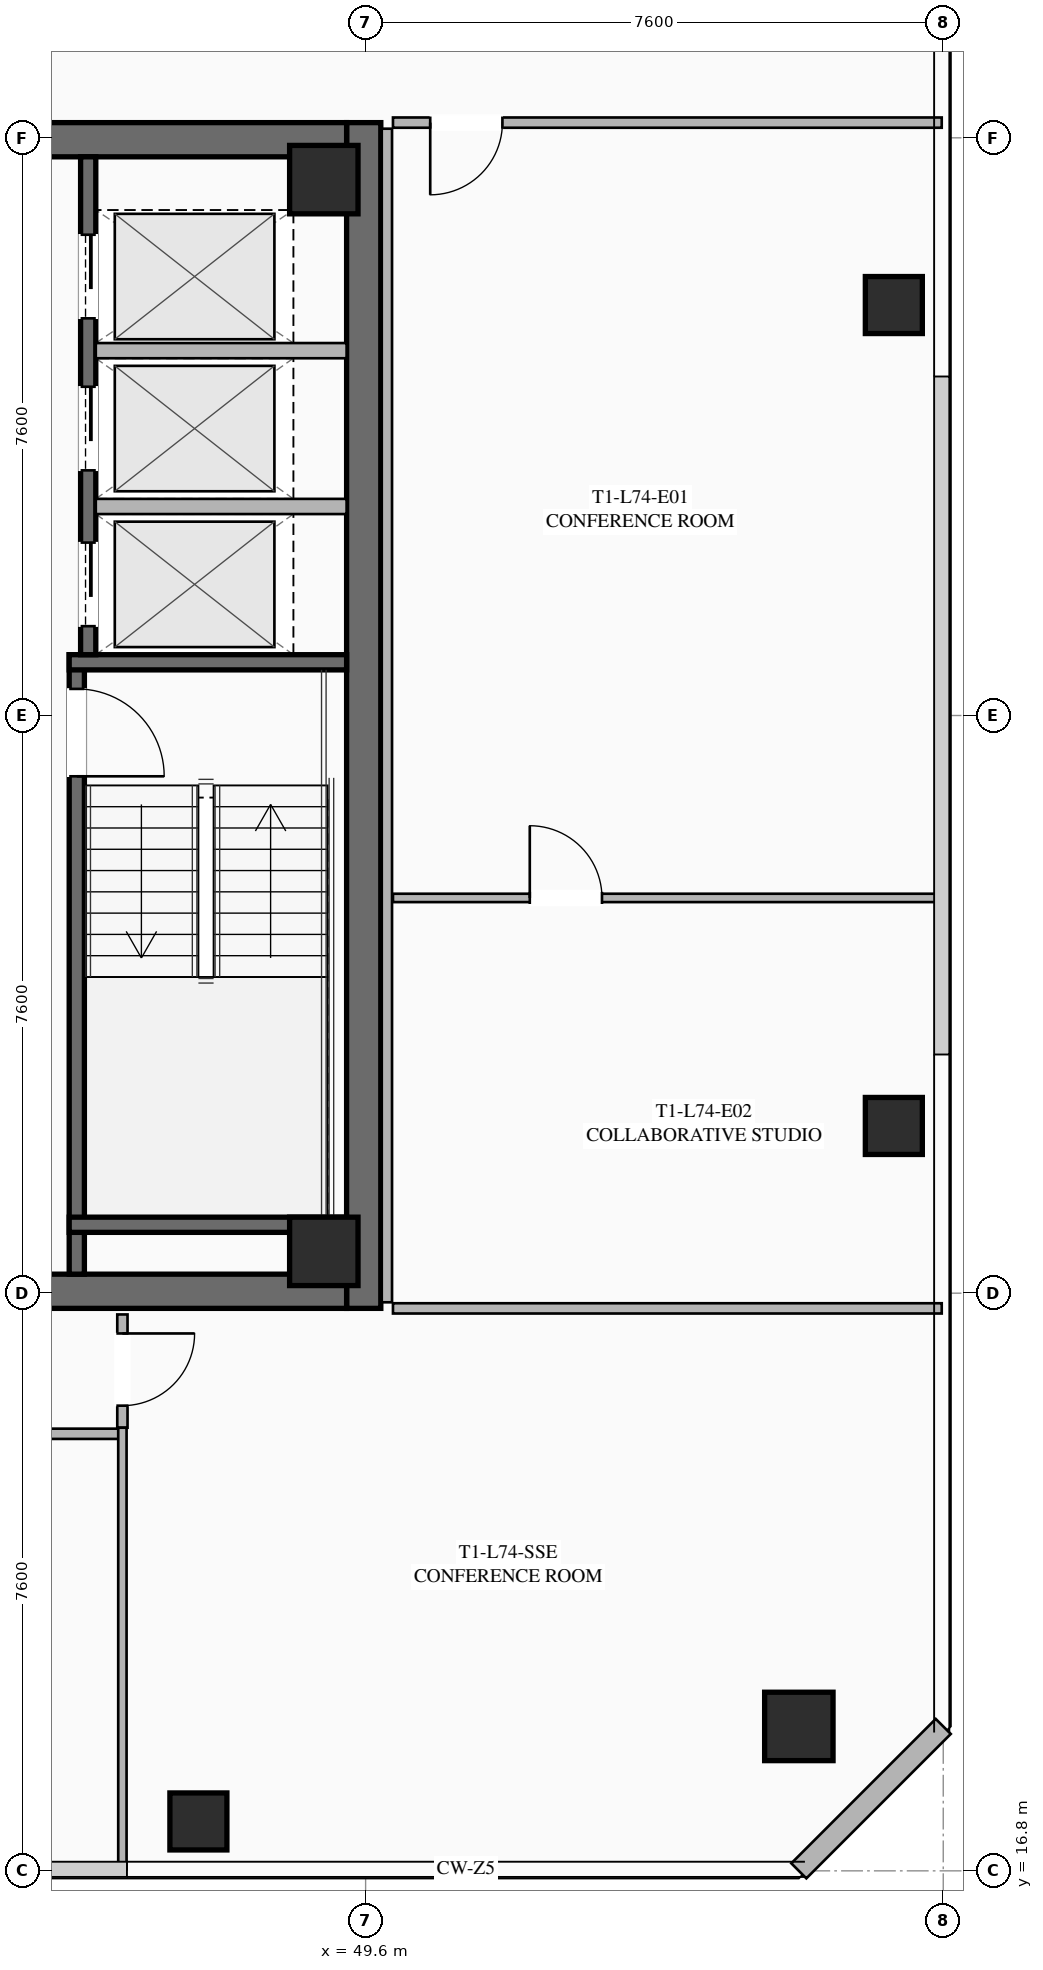
"""IFC4 building model, lengths in metres.
Left out: names, types, materials, properties, quantities, classifications, styles, units other than length and angle.
Written with IfcOpenShell. Run it as: python <this file> out.ifc"""

import sys

from ifc_helpers import new_model, si_unit, direction, frame, frame_2d, origin, origin_2d, place, context, subcontext, project, spatial, rectangle, hollow_rectangle, extrude, element, fill, save


model = new_model("IFC4")
c1 = context("Model", 3, precision=1e-05, world=origin(), true_north=direction((0.0, 1.0)))
c2 = subcontext(c1, "Body", "Model", "MODEL_VIEW")
j1 = project(units=[si_unit("LENGTHUNIT", "METRE"), si_unit("PLANEANGLEUNIT", "RADIAN")], contexts=[c1])
p1 = place(None, origin())
s1 = spatial("IfcSite", under=j1, at=p1, CompositionType="ELEMENT")
p2 = place(p1, origin())
s2 = spatial("IfcBuilding", under=s1, at=p2, CompositionType="ELEMENT")
p3 = place(p2, frame((0.0, 0.0, 274.05)))
s3 = spatial("IfcBuildingStorey", under=s2, at=p3, CompositionType="ELEMENT", Elevation=274.05)
p4 = place(p3, frame((49.575, 39.8, 0.0), z_axis=(0.0, 0.0, 1.0), x_axis=(0.0, -1.0, 0.0)))
e1 = element("IfcWall", 1, at=p4, inside=s3, PredefinedType="SHEAR", context=c2, shape_type="SweptSolid", body=[
    extrude(rectangle(XDim=15.6, YDim=0.45, at=frame_2d((7.8, 0.0))), origin(), (0.0, 0.0, 1.0), 3.55),
])
p5 = place(p3, frame((49.35, 24.425, 0.0), z_axis=(0.0, 0.0, 1.0), x_axis=(-1.0, 0.0, 0.0)))
e2 = element("IfcWall", 2, at=p5, inside=s3, PredefinedType="SHEAR", context=c2, shape_type="SweptSolid", body=[
    extrude(rectangle(XDim=14.7, YDim=0.45, at=frame_2d((7.35, 0.0))), origin(), (0.0, 0.0, 1.0), 3.55),
])
p6 = place(p5, frame((9.05, 0.0, 0.0)))
e3 = element("IfcOpeningElement", 3, at=p6, cuts=e2, PredefinedType="OPENING", context=c2, shape_type="SweptSolid", body=[
    extrude(rectangle(XDim=1.25, YDim=2.25, at=frame_2d((0.625, 1.125))), frame((0.0, 0.235, 0.0), z_axis=(0.0, -1.0, 0.0), x_axis=(1.0, 0.0, 0.0)), (0.0, 0.0, 1.0), 0.47),
])
p7 = place(p5, frame((4.0, 0.0, 0.0)))
e4 = element("IfcOpeningElement", 4, at=p7, cuts=e2, PredefinedType="OPENING", context=c2, shape_type="SweptSolid", body=[
    extrude(rectangle(XDim=1.25, YDim=2.25, at=frame_2d((0.625, 1.125))), frame((0.0, 0.235, 0.0), z_axis=(0.0, -1.0, 0.0), x_axis=(1.0, 0.0, 0.0)), (0.0, 0.0, 1.0), 0.47),
])
p8 = place(p3, frame((34.65, 39.575, 0.0), z_axis=(0.0, 0.0, 1.0), x_axis=(1.0, 0.0, 0.0)))
e5 = element("IfcWall", 5, at=p8, inside=s3, PredefinedType="SHEAR", context=c2, shape_type="SweptSolid", body=[
    extrude(rectangle(XDim=14.7, YDim=0.45, at=frame_2d((7.35, 0.0))), origin(), (0.0, 0.0, 1.0), 3.55),
])
p9 = place(p8, frame((4.4, 0.0, 0.0)))
e6 = element("IfcOpeningElement", 6, at=p9, cuts=e5, PredefinedType="OPENING", context=c2, shape_type="SweptSolid", body=[
    extrude(rectangle(XDim=1.25, YDim=2.25, at=frame_2d((0.625, 1.125))), frame((0.0, 0.235, 0.0), z_axis=(0.0, -1.0, 0.0), x_axis=(1.0, 0.0, 0.0)), (0.0, 0.0, 1.0), 0.47),
])
p10 = place(p8, frame((9.45, 0.0, 0.0)))
e7 = element("IfcOpeningElement", 7, at=p10, cuts=e5, PredefinedType="OPENING", context=c2, shape_type="SweptSolid", body=[
    extrude(rectangle(XDim=1.25, YDim=2.25, at=frame_2d((0.625, 1.125))), frame((0.0, 0.235, 0.0), z_axis=(0.0, -1.0, 0.0), x_axis=(1.0, 0.0, 0.0)), (0.0, 0.0, 1.0), 0.47),
])
for number, where, z_axis, x_axis in (
    (8, (49.05, 24.95, 0.0), (0.0, 0.0, 1.0), (1.0, 0.0, 0.0)),
    (9, (49.05, 39.05, 0.0), (0.0, 0.0, 1.0), (1.0, 0.0, 0.0)),
    (10, (55.3, 18.7, 0.0), (0.0, 0.0, 1.0), (1.0, 0.0, 0.0)),
):
    element("IfcColumn", number, at=place(p3, frame(where, z_axis=z_axis, x_axis=x_axis)), inside=s3, PredefinedType="COLUMN", context=c2, shape_type="SweptSolid", body=[
        extrude(hollow_rectangle(XDim=0.9, YDim=0.9, WallThickness=0.04, at=origin_2d()), origin(), (0.0, 0.0, 1.0), 3.25),
    ])
for number, where, z_axis, x_axis in (
    (11, (47.4, 17.45, 0.0), (0.0, 0.0, 1.0), (1.0, 0.0, 0.0)),
    (12, (56.55, 26.6, 0.0), (0.0, 0.0, 1.0), (1.0, 0.0, 0.0)),
    (13, (56.55, 37.4, 0.0), (0.0, 0.0, 1.0), (1.0, 0.0, 0.0)),
):
    element("IfcColumn", number, at=place(p3, frame(where, z_axis=z_axis, x_axis=x_axis)), inside=s3, PredefinedType="COLUMN", context=c2, shape_type="SweptSolid", body=[
        extrude(hollow_rectangle(XDim=0.75, YDim=0.75, WallThickness=0.032, at=origin_2d()), origin(), (0.0, 0.0, 1.0), 3.25),
    ])
p11 = place(p3, frame((57.2, 18.7, 0.0), z_axis=(0.0, 0.0, 1.0), x_axis=(-0.707106781187, -0.707106781187, 0.0)))
e14 = element("IfcWall", 14, at=p11, inside=s3, PredefinedType="SOLIDWALL", context=c2, shape_type="SweptSolid", body=[
    extrude(rectangle(XDim=2.687, YDim=0.28, at=frame_2d((1.343, 0.0))), origin(), (0.0, 0.0, 1.0), 3.25),
])
p12 = place(p3, frame((45.8, 32.8, 0.0), z_axis=(0.0, 0.0, 1.0), x_axis=(0.0, -1.0, 0.0)))
e15 = element("IfcWall", 15, at=p12, inside=s3, PredefinedType="SHEAR", context=c2, shape_type="SweptSolid", body=[
    extrude(rectangle(XDim=8.15, YDim=0.2, at=frame_2d((4.075, 0.0))), origin(), (0.0, 0.0, 1.0), 3.25),
])
p13 = place(p12, frame((0.45, 0.0, 0.0)))
e16 = element("IfcOpeningElement", 16, at=p13, cuts=e15, PredefinedType="OPENING", context=c2, shape_type="SweptSolid", body=[
    extrude(rectangle(XDim=1.15, YDim=2.2, at=frame_2d((0.575, 1.1))), frame((0.0, 0.11, 0.0), z_axis=(0.0, -1.0, 0.0), x_axis=(1.0, 0.0, 0.0)), (0.0, 0.0, 1.0), 0.22),
])
for number, where, z_axis, x_axis in (
    (17, (45.7, 32.7, 0.0), (0.0, 0.0, 1.0), (1.0, 0.0, 0.0)),
    (18, (45.7, 25.3, 0.0), (0.0, 0.0, 1.0), (1.0, 0.0, 0.0)),
):
    element("IfcWall", number, at=place(p3, frame(where, z_axis=z_axis, x_axis=x_axis)), inside=s3, PredefinedType="SHEAR", context=c2, shape_type="SweptSolid", body=[
        extrude(rectangle(XDim=3.65, YDim=0.2, at=frame_2d((1.825, 0.0))), origin(), (0.0, 0.0, 1.0), 3.25),
    ])
p14 = place(p3, frame((45.95, 39.35, 0.0), z_axis=(0.0, 0.0, 1.0), x_axis=(0.0, -1.0, 0.0)))
e19 = element("IfcWall", 19, at=p14, inside=s3, PredefinedType="SHEAR", context=c2, shape_type="SweptSolid", body=[
    extrude(rectangle(XDim=6.55, YDim=0.2, at=frame_2d((3.275, 0.0))), origin(), (0.0, 0.0, 1.0), 3.25),
])
p15 = place(p14, frame((5.075, 0.0, 0.0)))
e20 = element("IfcOpeningElement", 20, at=p15, cuts=e19, PredefinedType="OPENING", context=c2, shape_type="SweptSolid", body=[
    extrude(rectangle(XDim=1.1, YDim=2.2, at=frame_2d((0.55, 1.1))), frame((0.0, 0.11, 0.0), z_axis=(0.0, -1.0, 0.0), x_axis=(1.0, 0.0, 0.0)), (0.0, 0.0, 1.0), 0.22),
])
p16 = place(p14, frame((3.025, 0.0, 0.0)))
e21 = element("IfcOpeningElement", 21, at=p16, cuts=e19, PredefinedType="OPENING", context=c2, shape_type="SweptSolid", body=[
    extrude(rectangle(XDim=1.1, YDim=2.2, at=frame_2d((0.55, 1.1))), frame((0.0, 0.11, 0.0), z_axis=(0.0, -1.0, 0.0), x_axis=(1.0, 0.0, 0.0)), (0.0, 0.0, 1.0), 0.22),
])
p17 = place(p14, frame((1.025, 0.0, 0.0)))
e22 = element("IfcOpeningElement", 22, at=p17, cuts=e19, PredefinedType="OPENING", context=c2, shape_type="SweptSolid", body=[
    extrude(rectangle(XDim=1.1, YDim=2.2, at=frame_2d((0.55, 1.1))), frame((0.0, 0.11, 0.0), z_axis=(0.0, -1.0, 0.0), x_axis=(1.0, 0.0, 0.0)), (0.0, 0.0, 1.0), 0.22),
])
for number, where, z_axis, x_axis in (
    (23, (46.05, 34.75, 0.0), (0.0, 0.0, 1.0), (1.0, 0.0, 0.0)),
    (24, (46.05, 36.8, 0.0), (0.0, 0.0, 1.0), (1.0, 0.0, 0.0)),
):
    element("IfcWall", number, at=place(p3, frame(where, z_axis=z_axis, x_axis=x_axis)), inside=s3, PredefinedType="SOLIDWALL", context=c2, shape_type="SweptSolid", body=[
        extrude(rectangle(XDim=3.3, YDim=0.2, at=frame_2d((1.65, 0.0))), origin(), (0.0, 0.0, 1.0), 3.25),
    ])
p18 = place(p3, frame((46.4, 22.55, 0.0), z_axis=(0.0, 0.0, 1.0), x_axis=(-1.0, 0.0, 0.0)))
e25 = element("IfcWall", 25, at=p18, inside=s3, PredefinedType="PARTITIONING", context=c2, shape_type="SweptSolid", body=[
    extrude(rectangle(XDim=17.55, YDim=0.135, at=frame_2d((8.775, 0.0))), origin(), (0.0, 0.0, 1.0), 2.603),
])
p19 = place(p18, frame((16.22, 0.0, 0.0)))
e26 = element("IfcOpeningElement", 26, at=p19, cuts=e25, PredefinedType="OPENING", context=c2, shape_type="SweptSolid", body=[
    extrude(rectangle(XDim=0.95, YDim=2.05, at=frame_2d((0.475, 1.025))), frame((0.0, 0.077, 0.0), z_axis=(0.0, -1.0, 0.0), x_axis=(1.0, 0.0, 0.0)), (0.0, 0.0, 1.0), 0.155),
])
p20 = place(p18, frame((3.718, 0.0, 0.0)))
e27 = element("IfcOpeningElement", 27, at=p20, cuts=e25, PredefinedType="OPENING", context=c2, shape_type="SweptSolid", body=[
    extrude(rectangle(XDim=0.95, YDim=2.05, at=frame_2d((0.475, 1.025))), frame((0.0, 0.077, 0.0), z_axis=(0.0, -1.0, 0.0), x_axis=(1.0, 0.0, 0.0)), (0.0, 0.0, 1.0), 0.155),
])
p21 = place(p3, frame((46.4, 24.12, 0.0), z_axis=(0.0, 0.0, 1.0), x_axis=(0.0, -1.0, 0.0)))
e28 = element("IfcWall", 28, at=p21, inside=s3, PredefinedType="PARTITIONING", context=c2, shape_type="SweptSolid", body=[
    extrude(rectangle(XDim=1.49, YDim=0.135, at=frame_2d((0.745, 0.0))), origin(), (0.0, 0.0, 1.0), 2.603),
])
p22 = place(p21, frame((0.25, 0.0, 0.0)))
e29 = element("IfcOpeningElement", 29, at=p22, cuts=e28, PredefinedType="OPENING", context=c2, shape_type="SweptSolid", body=[
    extrude(rectangle(XDim=0.95, YDim=2.05, at=frame_2d((0.475, 1.025))), frame((0.0, 0.077, 0.0), z_axis=(0.0, -1.0, 0.0), x_axis=(1.0, 0.0, 0.0)), (0.0, 0.0, 1.0), 0.155),
])
p23 = place(p3, frame((46.4, 16.82, 0.0), z_axis=(0.0, 0.0, 1.0), x_axis=(0.0, 1.0, 0.0)))
e30 = element("IfcWall", 30, at=p23, inside=s3, PredefinedType="PARTITIONING", context=c2, shape_type="SweptSolid", body=[
    extrude(rectangle(XDim=5.81, YDim=0.11, at=frame_2d((2.905, 0.0))), origin(), (0.0, 0.0, 1.0), 2.603),
])
p24 = place(p3, frame((49.88, 39.72, 0.0), z_axis=(0.0, 0.0, 1.0), x_axis=(0.0, -1.0, 0.0)))
e31 = element("IfcWall", 31, at=p24, inside=s3, PredefinedType="PARTITIONING", context=c2, shape_type="SweptSolid", body=[
    extrude(rectangle(XDim=15.44, YDim=0.135, at=frame_2d((7.72, 0.0))), origin(), (0.0, 0.0, 1.0), 2.603),
])
p25 = place(p3, frame((57.18, 39.8, 0.0), z_axis=(0.0, 0.0, 1.0), x_axis=(-1.0, 0.0, 0.0)))
e32 = element("IfcWall", 32, at=p25, inside=s3, PredefinedType="PARTITIONING", context=c2, shape_type="SweptSolid", body=[
    extrude(rectangle(XDim=7.22, YDim=0.135, at=frame_2d((3.61, 0.0))), origin(), (0.0, 0.0, 1.0), 2.603),
])
p26 = place(p25, frame((5.78, 0.0, 0.0)))
e33 = element("IfcOpeningElement", 33, at=p26, cuts=e32, PredefinedType="OPENING", context=c2, shape_type="SweptSolid", body=[
    extrude(rectangle(XDim=0.95, YDim=2.05, at=frame_2d((0.475, 1.025))), frame((0.0, 0.077, 0.0), z_axis=(0.0, -1.0, 0.0), x_axis=(1.0, 0.0, 0.0)), (0.0, 0.0, 1.0), 0.155),
])
p27 = place(p3, frame((49.96, 24.2, 0.0), z_axis=(0.0, 0.0, 1.0), x_axis=(1.0, 0.0, 0.0)))
e34 = element("IfcWall", 34, at=p27, inside=s3, PredefinedType="PARTITIONING", context=c2, shape_type="SweptSolid", body=[
    extrude(rectangle(XDim=7.22, YDim=0.135, at=frame_2d((3.61, 0.0))), origin(), (0.0, 0.0, 1.0), 2.603),
])
p28 = place(p3, frame((49.96, 29.6, 0.0), z_axis=(0.0, 0.0, 1.0), x_axis=(1.0, 0.0, 0.0)))
e35 = element("IfcWall", 35, at=p28, inside=s3, PredefinedType="PARTITIONING", context=c2, shape_type="SweptSolid", body=[
    extrude(rectangle(XDim=7.22, YDim=0.11, at=frame_2d((3.61, 0.0))), origin(), (0.0, 0.0, 1.0), 2.603),
])
p29 = place(p28, frame((1.8, 0.0, 0.0)))
e36 = element("IfcOpeningElement", 36, at=p29, cuts=e35, PredefinedType="OPENING", context=c2, shape_type="SweptSolid", body=[
    extrude(rectangle(XDim=0.95, YDim=2.05, at=frame_2d((0.475, 1.025))), frame((0.0, 0.065, 0.0), z_axis=(0.0, -1.0, 0.0), x_axis=(1.0, 0.0, 0.0)), (0.0, 0.0, 1.0), 0.13),
])
p30 = place(p13, origin())
e37 = element("IfcDoor", 37, at=p30, inside=s3, OperationType="SINGLE_SWING_RIGHT", PredefinedType="DOOR", context=c2, shape_type="SweptSolid", body=[
    extrude(rectangle(XDim=1.15, YDim=2.2, at=frame_2d((0.575, 1.1))), frame((0.0, 0.025, 0.0), z_axis=(0.0, -1.0, 0.0), x_axis=(1.0, 0.0, 0.0)), (0.0, 0.0, 1.0), 0.05),
])
fill(e16, e37)
p31 = place(p22, origin())
e38 = element("IfcDoor", 38, at=p31, inside=s3, OperationType="SINGLE_SWING_LEFT", PredefinedType="DOOR", context=c2, shape_type="SweptSolid", body=[
    extrude(rectangle(XDim=0.95, YDim=2.05, at=frame_2d((0.475, 1.025))), frame((0.0, 0.025, 0.0), z_axis=(0.0, -1.0, 0.0), x_axis=(1.0, 0.0, 0.0)), (0.0, 0.0, 1.0), 0.05),
])
fill(e29, e38)
p32 = place(p26, origin())
e39 = element("IfcDoor", 39, at=p32, inside=s3, OperationType="SINGLE_SWING_RIGHT", PredefinedType="DOOR", context=c2, shape_type="SweptSolid", body=[
    extrude(rectangle(XDim=0.95, YDim=2.05, at=frame_2d((0.475, 1.025))), frame((0.0, 0.025, 0.0), z_axis=(0.0, -1.0, 0.0), x_axis=(1.0, 0.0, 0.0)), (0.0, 0.0, 1.0), 0.05),
])
fill(e33, e39)
p33 = place(p29, origin())
e40 = element("IfcDoor", 40, at=p33, inside=s3, OperationType="SINGLE_SWING_LEFT", PredefinedType="DOOR", context=c2, shape_type="SweptSolid", body=[
    extrude(rectangle(XDim=0.95, YDim=2.05, at=frame_2d((0.475, 1.025))), frame((0.0, 0.025, 0.0), z_axis=(0.0, -1.0, 0.0), x_axis=(1.0, 0.0, 0.0)), (0.0, 0.0, 1.0), 0.05),
])
fill(e36, e40)
p34 = place(p15, origin())
e41 = element("IfcDoor", 41, at=p34, inside=s3, OperationType="SLIDING_TO_LEFT", PredefinedType="DOOR", context=c2, shape_type="SweptSolid", body=[
    extrude(rectangle(XDim=1.1, YDim=2.2, at=frame_2d((0.55, 1.1))), frame((0.0, 0.025, 0.0), z_axis=(0.0, -1.0, 0.0), x_axis=(1.0, 0.0, 0.0)), (0.0, 0.0, 1.0), 0.05),
])
fill(e20, e41)
p35 = place(p16, origin())
e42 = element("IfcDoor", 42, at=p35, inside=s3, OperationType="SLIDING_TO_LEFT", PredefinedType="DOOR", context=c2, shape_type="SweptSolid", body=[
    extrude(rectangle(XDim=1.1, YDim=2.2, at=frame_2d((0.55, 1.1))), frame((0.0, 0.025, 0.0), z_axis=(0.0, -1.0, 0.0), x_axis=(1.0, 0.0, 0.0)), (0.0, 0.0, 1.0), 0.05),
])
fill(e21, e42)
p36 = place(p17, origin())
e43 = element("IfcDoor", 43, at=p36, inside=s3, OperationType="SLIDING_TO_LEFT", PredefinedType="DOOR", context=c2, shape_type="SweptSolid", body=[
    extrude(rectangle(XDim=1.1, YDim=2.2, at=frame_2d((0.55, 1.1))), frame((0.0, 0.025, 0.0), z_axis=(0.0, -1.0, 0.0), x_axis=(1.0, 0.0, 0.0)), (0.0, 0.0, 1.0), 0.05),
])
fill(e22, e43)
save(model, sys.argv[1])
